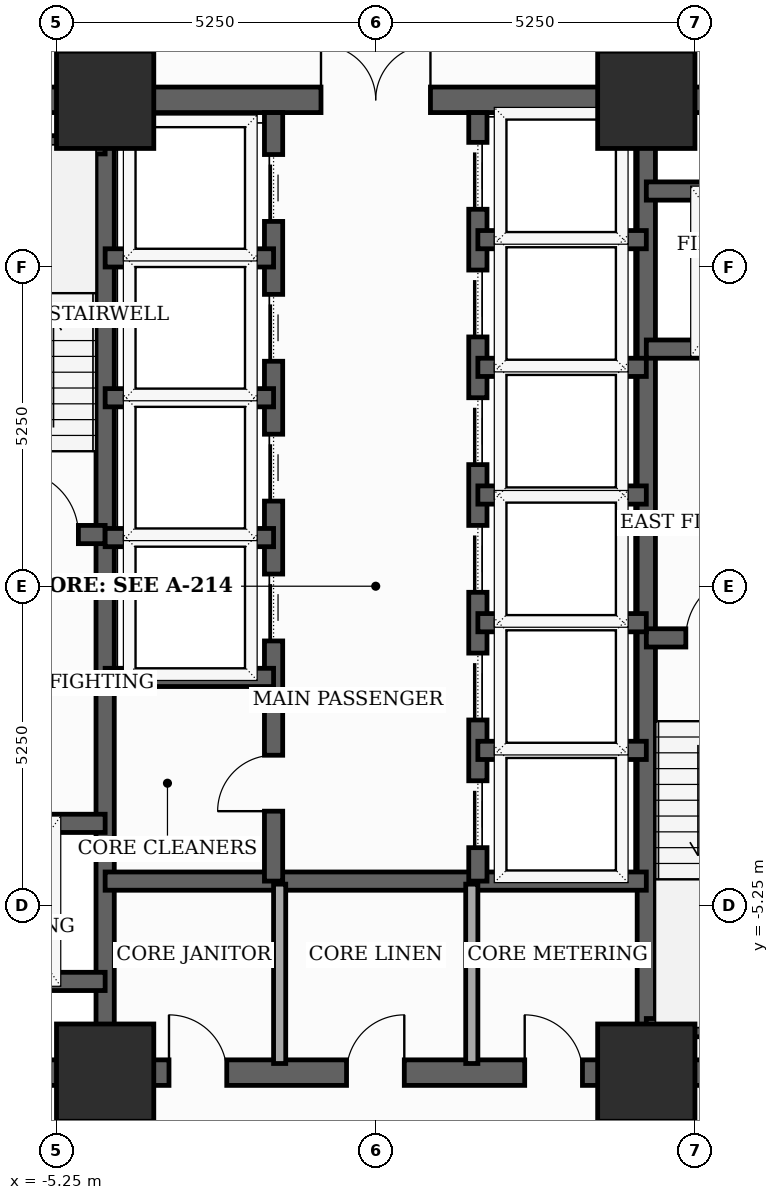
"""IFC4 building model, lengths in metres.
Left out: names, types, materials, properties, quantities, classifications, styles, units other than length and angle.
Written with IfcOpenShell. Run it as: python <this file> out.ifc"""

import sys

from ifc_helpers import new_model, si_unit, direction, frame, frame_2d, origin, origin_2d, place, context, subcontext, project, spatial, rectangle, extrude, element, fill, save


model = new_model("IFC4")
c1 = context("Model", 3, precision=1e-05, world=origin(), true_north=direction((0.0, 1.0)))
c2 = subcontext(c1, "Body", "Model", "MODEL_VIEW")
j1 = project(units=[si_unit("LENGTHUNIT", "METRE"), si_unit("PLANEANGLEUNIT", "RADIAN")], contexts=[c1])
p1 = place(None, origin())
s1 = spatial("IfcSite", under=j1, at=p1, CompositionType="ELEMENT")
p2 = place(p1, origin())
s2 = spatial("IfcBuilding", under=s1, at=p2, CompositionType="ELEMENT")
p3 = place(p2, frame((0.0, 0.0, 70.4)))
s3 = spatial("IfcBuildingStorey", under=s2, at=p3, CompositionType="ELEMENT", Elevation=70.4)
for number, where, z_axis, x_axis in (
    (1, (-4.45, -8.0, 0.0), (0.0, 0.0, 1.0), (1.0, 0.0, 0.0)),
    (2, (4.45, -8.0, 0.0), (0.0, 0.0, 1.0), (1.0, 0.0, 0.0)),
    (3, (4.45, 8.0, 0.0), (0.0, 0.0, 1.0), (1.0, 0.0, 0.0)),
    (4, (-4.45, 8.0, 0.0), (0.0, 0.0, 1.0), (1.0, 0.0, 0.0)),
):
    element("IfcColumn", number, at=place(p3, frame(where, z_axis=z_axis, x_axis=x_axis)), inside=s3, PredefinedType="COLUMN", context=c2, shape_type="SweptSolid", body=[
        extrude(rectangle(XDim=1.6, YDim=1.6, at=origin_2d()), origin(), (0.0, 0.0, 1.0), 3.7),
    ])
p4 = place(p3, frame((-8.0, -8.0, 0.0), z_axis=(0.0, 0.0, 1.0), x_axis=(1.0, 0.0, 0.0)))
e5 = element("IfcWall", 5, at=p4, inside=s3, PredefinedType="SHEAR", context=c2, shape_type="SweptSolid", body=[
    extrude(rectangle(XDim=16.0, YDim=0.42, at=frame_2d((8.0, 0.0))), origin(), (0.0, 0.0, 1.0), 3.5),
])
p5 = place(p4, frame((4.6, 0.0, 0.0)))
e6 = element("IfcOpeningElement", 6, at=p5, cuts=e5, PredefinedType="OPENING", context=c2, shape_type="SweptSolid", body=[
    extrude(rectangle(XDim=0.95, YDim=2.1, at=frame_2d((0.475, 1.05))), frame((0.0, 0.22, 0.0), z_axis=(0.0, -1.0, 0.0), x_axis=(1.0, 0.0, 0.0)), (0.0, 0.0, 1.0), 0.44),
])
p6 = place(p4, frame((7.52, 0.0, 0.0)))
e7 = element("IfcOpeningElement", 7, at=p6, cuts=e5, PredefinedType="OPENING", context=c2, shape_type="SweptSolid", body=[
    extrude(rectangle(XDim=0.95, YDim=2.1, at=frame_2d((0.475, 1.05))), frame((0.0, 0.22, 0.0), z_axis=(0.0, -1.0, 0.0), x_axis=(1.0, 0.0, 0.0)), (0.0, 0.0, 1.0), 0.44),
])
p7 = place(p4, frame((10.45, 0.0, 0.0)))
e8 = element("IfcOpeningElement", 8, at=p7, cuts=e5, PredefinedType="OPENING", context=c2, shape_type="SweptSolid", body=[
    extrude(rectangle(XDim=0.95, YDim=2.1, at=frame_2d((0.475, 1.05))), frame((0.0, 0.22, 0.0), z_axis=(0.0, -1.0, 0.0), x_axis=(1.0, 0.0, 0.0)), (0.0, 0.0, 1.0), 0.44),
])
p8 = place(p3, frame((-8.0, 8.0, 0.0), z_axis=(0.0, 0.0, 1.0), x_axis=(1.0, 0.0, 0.0)))
e9 = element("IfcWall", 9, at=p8, inside=s3, PredefinedType="SHEAR", context=c2, shape_type="SweptSolid", body=[
    extrude(rectangle(XDim=16.0, YDim=0.42, at=frame_2d((8.0, 0.0))), origin(), (0.0, 0.0, 1.0), 3.5),
])
p9 = place(p8, frame((7.1, 0.0, 0.0)))
e10 = element("IfcOpeningElement", 10, at=p9, cuts=e9, PredefinedType="OPENING", context=c2, shape_type="SweptSolid", body=[
    extrude(rectangle(XDim=1.8, YDim=2.15, at=frame_2d((0.9, 1.075))), frame((0.0, 0.22, 0.0), z_axis=(0.0, -1.0, 0.0), x_axis=(1.0, 0.0, 0.0)), (0.0, 0.0, 1.0), 0.44),
])
for number, where, z_axis, x_axis in (
    (11, (-4.45, -7.79, 0.0), (0.0, 0.0, 1.0), (0.0, 1.0, 0.0)),
    (12, (4.45, -7.79, 0.0), (0.0, 0.0, 1.0), (0.0, 1.0, 0.0)),
):
    element("IfcWall", number, at=place(p3, frame(where, z_axis=z_axis, x_axis=x_axis)), inside=s3, PredefinedType="SHEAR", context=c2, shape_type="SweptSolid", body=[
        extrude(rectangle(XDim=15.58, YDim=0.3, at=frame_2d((7.79, 0.0))), origin(), (0.0, 0.0, 1.0), 3.5),
    ])
p10 = place(p3, frame((-7.79, 0.85, 0.0), z_axis=(0.0, 0.0, 1.0), x_axis=(1.0, 0.0, 0.0)))
e13 = element("IfcWall", 13, at=p10, inside=s3, PredefinedType="SHEAR", context=c2, shape_type="SweptSolid", body=[
    extrude(rectangle(XDim=3.34, YDim=0.3, at=frame_2d((1.67, 0.0))), origin(), (0.0, 0.0, 1.0), 3.5),
])
p11 = place(p10, frame((1.85, 0.0, 0.0)))
e14 = element("IfcOpeningElement", 14, at=p11, cuts=e13, PredefinedType="OPENING", context=c2, shape_type="SweptSolid", body=[
    extrude(rectangle(XDim=1.05, YDim=2.15, at=frame_2d((0.525, 1.075))), frame((0.0, 0.16, 0.0), z_axis=(0.0, -1.0, 0.0), x_axis=(1.0, 0.0, 0.0)), (0.0, 0.0, 1.0), 0.32),
])
p12 = place(p3, frame((-7.79, 7.26, 0.0), z_axis=(0.0, 0.0, 1.0), x_axis=(1.0, 0.0, 0.0)))
e15 = element("IfcWall", 15, at=p12, inside=s3, PredefinedType="SHEAR", context=c2, shape_type="SweptSolid", body=[
    extrude(rectangle(XDim=3.34, YDim=0.3, at=frame_2d((1.67, 0.0))), origin(), (0.0, 0.0, 1.0), 3.5),
])
p13 = place(p3, frame((4.45, -0.85, 0.0), z_axis=(0.0, 0.0, 1.0), x_axis=(1.0, 0.0, 0.0)))
e16 = element("IfcWall", 16, at=p13, inside=s3, PredefinedType="SHEAR", context=c2, shape_type="SweptSolid", body=[
    extrude(rectangle(XDim=3.34, YDim=0.3, at=frame_2d((1.67, 0.0))), origin(), (0.0, 0.0, 1.0), 3.5),
])
p14 = place(p13, frame((0.65, 0.0, 0.0)))
e17 = element("IfcOpeningElement", 17, at=p14, cuts=e16, PredefinedType="OPENING", context=c2, shape_type="SweptSolid", body=[
    extrude(rectangle(XDim=1.05, YDim=2.15, at=frame_2d((0.525, 1.075))), frame((0.0, 0.16, 0.0), z_axis=(0.0, -1.0, 0.0), x_axis=(1.0, 0.0, 0.0)), (0.0, 0.0, 1.0), 0.32),
])
p15 = place(p3, frame((4.45, -7.26, 0.0), z_axis=(0.0, 0.0, 1.0), x_axis=(1.0, 0.0, 0.0)))
e18 = element("IfcWall", 18, at=p15, inside=s3, PredefinedType="SHEAR", context=c2, shape_type="SweptSolid", body=[
    extrude(rectangle(XDim=3.55, YDim=0.3, at=frame_2d((1.775, 0.0))), origin(), (0.0, 0.0, 1.0), 3.5),
])
p16 = place(p3, frame((-7.79, -3.9, 0.0), z_axis=(0.0, 0.0, 1.0), x_axis=(1.0, 0.0, 0.0)))
e19 = element("IfcWall", 19, at=p16, inside=s3, PredefinedType="SHEAR", context=c2, shape_type="SweptSolid", body=[
    extrude(rectangle(XDim=3.34, YDim=0.3, at=frame_2d((1.67, 0.0))), origin(), (0.0, 0.0, 1.0), 3.5),
])
p17 = place(p16, frame((1.27, 0.0, 0.0)))
e20 = element("IfcOpeningElement", 20, at=p17, cuts=e19, PredefinedType="OPENING", context=c2, shape_type="SweptSolid", body=[
    extrude(rectangle(XDim=1.1, YDim=2.1, at=frame_2d((0.55, 1.05))), frame((0.0, 0.16, 0.0), z_axis=(0.0, -1.0, 0.0), x_axis=(1.0, 0.0, 0.0)), (0.0, 0.0, 1.0), 0.32),
])
p18 = place(p3, frame((-7.79, -6.5, 0.0), z_axis=(0.0, 0.0, 1.0), x_axis=(1.0, 0.0, 0.0)))
e21 = element("IfcWall", 21, at=p18, inside=s3, PredefinedType="SHEAR", context=c2, shape_type="SweptSolid", body=[
    extrude(rectangle(XDim=3.34, YDim=0.3, at=frame_2d((1.67, 0.0))), origin(), (0.0, 0.0, 1.0), 3.5),
])
p19 = place(p3, frame((4.45, 3.9, 0.0), z_axis=(0.0, 0.0, 1.0), x_axis=(1.0, 0.0, 0.0)))
e22 = element("IfcWall", 22, at=p19, inside=s3, PredefinedType="SHEAR", context=c2, shape_type="SweptSolid", body=[
    extrude(rectangle(XDim=3.34, YDim=0.3, at=frame_2d((1.67, 0.0))), origin(), (0.0, 0.0, 1.0), 3.5),
])
p20 = place(p19, frame((1.18, 0.0, 0.0)))
e23 = element("IfcOpeningElement", 23, at=p20, cuts=e22, PredefinedType="OPENING", context=c2, shape_type="SweptSolid", body=[
    extrude(rectangle(XDim=1.1, YDim=2.1, at=frame_2d((0.55, 1.05))), frame((0.0, 0.16, 0.0), z_axis=(0.0, -1.0, 0.0), x_axis=(1.0, 0.0, 0.0)), (0.0, 0.0, 1.0), 0.32),
])
p21 = place(p3, frame((4.45, 6.5, 0.0), z_axis=(0.0, 0.0, 1.0), x_axis=(1.0, 0.0, 0.0)))
e24 = element("IfcWall", 24, at=p21, inside=s3, PredefinedType="SHEAR", context=c2, shape_type="SweptSolid", body=[
    extrude(rectangle(XDim=3.34, YDim=0.3, at=frame_2d((1.67, 0.0))), origin(), (0.0, 0.0, 1.0), 3.5),
])
p22 = place(p3, frame((-4.45, -4.85, 0.0), z_axis=(0.0, 0.0, 1.0), x_axis=(1.0, 0.0, 0.0)))
e25 = element("IfcWall", 25, at=p22, inside=s3, PredefinedType="SHEAR", context=c2, shape_type="SweptSolid", body=[
    extrude(rectangle(XDim=8.9, YDim=0.3, at=frame_2d((4.45, 0.0))), origin(), (0.0, 0.0, 1.0), 3.5),
])
p23 = place(p3, frame((-1.68, -4.85, 0.0), z_axis=(0.0, 0.0, 1.0), x_axis=(0.0, 1.0, 0.0)))
e26 = element("IfcWall", 26, at=p23, inside=s3, PredefinedType="SHEAR", context=c2, shape_type="SweptSolid", body=[
    extrude(rectangle(XDim=12.64, YDim=0.3, at=frame_2d((6.32, 0.0))), origin(), (0.0, 0.0, 1.0), 3.5),
])
p24 = place(p23, frame((3.95, 0.0, 0.0)))
e27 = element("IfcOpeningElement", 27, at=p24, cuts=e26, PredefinedType="OPENING", context=c2, shape_type="SweptSolid", body=[
    extrude(rectangle(XDim=1.1, YDim=2.1, at=frame_2d((0.55, 1.05))), frame((0.0, 0.16, 0.0), z_axis=(0.0, -1.0, 0.0), x_axis=(1.0, 0.0, 0.0)), (0.0, 0.0, 1.0), 0.32),
])
p25 = place(p23, frame((6.25, 0.0, 0.0)))
e28 = element("IfcOpeningElement", 28, at=p25, cuts=e26, PredefinedType="OPENING", context=c2, shape_type="SweptSolid", body=[
    extrude(rectangle(XDim=1.1, YDim=2.1, at=frame_2d((0.55, 1.05))), frame((0.0, 0.16, 0.0), z_axis=(0.0, -1.0, 0.0), x_axis=(1.0, 0.0, 0.0)), (0.0, 0.0, 1.0), 0.32),
])
p26 = place(p23, frame((8.55, 0.0, 0.0)))
e29 = element("IfcOpeningElement", 29, at=p26, cuts=e26, PredefinedType="OPENING", context=c2, shape_type="SweptSolid", body=[
    extrude(rectangle(XDim=1.1, YDim=2.1, at=frame_2d((0.55, 1.05))), frame((0.0, 0.16, 0.0), z_axis=(0.0, -1.0, 0.0), x_axis=(1.0, 0.0, 0.0)), (0.0, 0.0, 1.0), 0.32),
])
p27 = place(p23, frame((10.85, 0.0, 0.0)))
e30 = element("IfcOpeningElement", 30, at=p27, cuts=e26, PredefinedType="OPENING", context=c2, shape_type="SweptSolid", body=[
    extrude(rectangle(XDim=1.1, YDim=2.1, at=frame_2d((0.55, 1.05))), frame((0.0, 0.16, 0.0), z_axis=(0.0, -1.0, 0.0), x_axis=(1.0, 0.0, 0.0)), (0.0, 0.0, 1.0), 0.32),
])
p28 = place(p23, frame((1.15, 0.0, 0.0)))
e31 = element("IfcOpeningElement", 31, at=p28, cuts=e26, PredefinedType="OPENING", context=c2, shape_type="SweptSolid", body=[
    extrude(rectangle(XDim=0.92, YDim=2.1, at=frame_2d((0.46, 1.05))), frame((0.0, 0.16, 0.0), z_axis=(0.0, -1.0, 0.0), x_axis=(1.0, 0.0, 0.0)), (0.0, 0.0, 1.0), 0.32),
])
p29 = place(p3, frame((1.68, -4.85, 0.0), z_axis=(0.0, 0.0, 1.0), x_axis=(0.0, 1.0, 0.0)))
e32 = element("IfcWall", 32, at=p29, inside=s3, PredefinedType="SHEAR", context=c2, shape_type="SweptSolid", body=[
    extrude(rectangle(XDim=12.64, YDim=0.3, at=frame_2d((6.32, 0.0))), origin(), (0.0, 0.0, 1.0), 3.5),
])
p30 = place(p29, frame((0.55, 0.0, 0.0)))
e33 = element("IfcOpeningElement", 33, at=p30, cuts=e32, PredefinedType="OPENING", context=c2, shape_type="SweptSolid", body=[
    extrude(rectangle(XDim=1.1, YDim=2.1, at=frame_2d((0.55, 1.05))), frame((0.0, 0.16, 0.0), z_axis=(0.0, -1.0, 0.0), x_axis=(1.0, 0.0, 0.0)), (0.0, 0.0, 1.0), 0.32),
])
p31 = place(p29, frame((2.65, 0.0, 0.0)))
e34 = element("IfcOpeningElement", 34, at=p31, cuts=e32, PredefinedType="OPENING", context=c2, shape_type="SweptSolid", body=[
    extrude(rectangle(XDim=1.1, YDim=2.1, at=frame_2d((0.55, 1.05))), frame((0.0, 0.16, 0.0), z_axis=(0.0, -1.0, 0.0), x_axis=(1.0, 0.0, 0.0)), (0.0, 0.0, 1.0), 0.32),
])
p32 = place(p29, frame((4.75, 0.0, 0.0)))
e35 = element("IfcOpeningElement", 35, at=p32, cuts=e32, PredefinedType="OPENING", context=c2, shape_type="SweptSolid", body=[
    extrude(rectangle(XDim=1.1, YDim=2.1, at=frame_2d((0.55, 1.05))), frame((0.0, 0.16, 0.0), z_axis=(0.0, -1.0, 0.0), x_axis=(1.0, 0.0, 0.0)), (0.0, 0.0, 1.0), 0.32),
])
p33 = place(p29, frame((6.85, 0.0, 0.0)))
e36 = element("IfcOpeningElement", 36, at=p33, cuts=e32, PredefinedType="OPENING", context=c2, shape_type="SweptSolid", body=[
    extrude(rectangle(XDim=1.1, YDim=2.1, at=frame_2d((0.55, 1.05))), frame((0.0, 0.16, 0.0), z_axis=(0.0, -1.0, 0.0), x_axis=(1.0, 0.0, 0.0)), (0.0, 0.0, 1.0), 0.32),
])
p34 = place(p29, frame((8.95, 0.0, 0.0)))
e37 = element("IfcOpeningElement", 37, at=p34, cuts=e32, PredefinedType="OPENING", context=c2, shape_type="SweptSolid", body=[
    extrude(rectangle(XDim=1.1, YDim=2.1, at=frame_2d((0.55, 1.05))), frame((0.0, 0.16, 0.0), z_axis=(0.0, -1.0, 0.0), x_axis=(1.0, 0.0, 0.0)), (0.0, 0.0, 1.0), 0.32),
])
p35 = place(p29, frame((11.05, 0.0, 0.0)))
e38 = element("IfcOpeningElement", 38, at=p35, cuts=e32, PredefinedType="OPENING", context=c2, shape_type="SweptSolid", body=[
    extrude(rectangle(XDim=1.1, YDim=2.1, at=frame_2d((0.55, 1.05))), frame((0.0, 0.16, 0.0), z_axis=(0.0, -1.0, 0.0), x_axis=(1.0, 0.0, 0.0)), (0.0, 0.0, 1.0), 0.32),
])
for number, where, z_axis, x_axis in (
    (39, (-4.45, -1.5, 0.0), (0.0, 0.0, 1.0), (1.0, 0.0, 0.0)),
    (40, (-4.45, 0.8, 0.0), (0.0, 0.0, 1.0), (1.0, 0.0, 0.0)),
    (41, (-4.45, 3.1, 0.0), (0.0, 0.0, 1.0), (1.0, 0.0, 0.0)),
    (42, (-4.45, 5.4, 0.0), (0.0, 0.0, 1.0), (1.0, 0.0, 0.0)),
    (43, (1.68, 1.5, 0.0), (0.0, 0.0, 1.0), (1.0, 0.0, 0.0)),
    (44, (1.68, 3.6, 0.0), (0.0, 0.0, 1.0), (1.0, 0.0, 0.0)),
    (45, (1.68, 5.7, 0.0), (0.0, 0.0, 1.0), (1.0, 0.0, 0.0)),
    (46, (1.68, -2.7, 0.0), (0.0, 0.0, 1.0), (1.0, 0.0, 0.0)),
    (47, (1.68, -0.6, 0.0), (0.0, 0.0, 1.0), (1.0, 0.0, 0.0)),
):
    element("IfcWall", number, at=place(p3, frame(where, z_axis=z_axis, x_axis=x_axis)), inside=s3, PredefinedType="SHEAR", context=c2, shape_type="SweptSolid", body=[
        extrude(rectangle(XDim=2.77, YDim=0.3, at=frame_2d((1.385, 0.0))), origin(), (0.0, 0.0, 1.0), 3.5),
    ])
for number, where, z_axis, x_axis in (
    (48, (-1.58, -7.85, 0.0), (0.0, 0.0, 1.0), (0.0, 1.0, 0.0)),
    (49, (1.58, -7.85, 0.0), (0.0, 0.0, 1.0), (0.0, 1.0, 0.0)),
):
    element("IfcWall", number, at=place(p3, frame(where, z_axis=z_axis, x_axis=x_axis)), inside=s3, PredefinedType="SOLIDWALL", context=c2, shape_type="SweptSolid", body=[
        extrude(rectangle(XDim=2.95, YDim=0.2, at=frame_2d((1.475, 0.0))), origin(), (0.0, 0.0, 1.0), 2.885),
    ])
p36 = place(p5, origin())
e50 = element("IfcDoor", 50, at=p36, inside=s3, OperationType="SINGLE_SWING_LEFT", PredefinedType="DOOR", context=c2, shape_type="SweptSolid", body=[
    extrude(rectangle(XDim=0.95, YDim=2.1, at=frame_2d((0.475, 1.05))), frame((0.0, 0.025, 0.0), z_axis=(0.0, -1.0, 0.0), x_axis=(1.0, 0.0, 0.0)), (0.0, 0.0, 1.0), 0.05),
])
fill(e6, e50)
p37 = place(p6, origin())
e51 = element("IfcDoor", 51, at=p37, inside=s3, OperationType="SINGLE_SWING_RIGHT", PredefinedType="DOOR", context=c2, shape_type="SweptSolid", body=[
    extrude(rectangle(XDim=0.95, YDim=2.1, at=frame_2d((0.475, 1.05))), frame((0.0, 0.025, 0.0), z_axis=(0.0, -1.0, 0.0), x_axis=(1.0, 0.0, 0.0)), (0.0, 0.0, 1.0), 0.05),
])
fill(e7, e51)
p38 = place(p7, origin())
e52 = element("IfcDoor", 52, at=p38, inside=s3, OperationType="SINGLE_SWING_LEFT", PredefinedType="DOOR", context=c2, shape_type="SweptSolid", body=[
    extrude(rectangle(XDim=0.95, YDim=2.1, at=frame_2d((0.475, 1.05))), frame((0.0, 0.025, 0.0), z_axis=(0.0, -1.0, 0.0), x_axis=(1.0, 0.0, 0.0)), (0.0, 0.0, 1.0), 0.05),
])
fill(e8, e52)
p39 = place(p9, origin())
e53 = element("IfcDoor", 53, at=p39, inside=s3, OperationType="DOUBLE_DOOR_SINGLE_SWING", PredefinedType="DOOR", context=c2, shape_type="SweptSolid", body=[
    extrude(rectangle(XDim=1.8, YDim=2.15, at=frame_2d((0.9, 1.075))), frame((0.0, 0.025, 0.0), z_axis=(0.0, -1.0, 0.0), x_axis=(1.0, 0.0, 0.0)), (0.0, 0.0, 1.0), 0.05),
])
fill(e10, e53)
p40 = place(p11, origin())
e54 = element("IfcDoor", 54, at=p40, inside=s3, OperationType="SINGLE_SWING_LEFT", PredefinedType="DOOR", context=c2, shape_type="SweptSolid", body=[
    extrude(rectangle(XDim=1.05, YDim=2.15, at=frame_2d((0.525, 1.075))), frame((0.0, 0.025, 0.0), z_axis=(0.0, -1.0, 0.0), x_axis=(1.0, 0.0, 0.0)), (0.0, 0.0, 1.0), 0.05),
])
fill(e14, e54)
p41 = place(p14, origin())
e55 = element("IfcDoor", 55, at=p41, inside=s3, OperationType="SINGLE_SWING_RIGHT", PredefinedType="DOOR", context=c2, shape_type="SweptSolid", body=[
    extrude(rectangle(XDim=1.05, YDim=2.15, at=frame_2d((0.525, 1.075))), frame((0.0, 0.025, 0.0), z_axis=(0.0, -1.0, 0.0), x_axis=(1.0, 0.0, 0.0)), (0.0, 0.0, 1.0), 0.05),
])
fill(e17, e55)
p42 = place(p24, origin())
e56 = element("IfcDoor", 56, at=p42, inside=s3, OperationType="SLIDING_TO_LEFT", PredefinedType="DOOR", context=c2, shape_type="SweptSolid", body=[
    extrude(rectangle(XDim=1.1, YDim=2.1, at=frame_2d((0.55, 1.05))), frame((0.0, 0.025, 0.0), z_axis=(0.0, -1.0, 0.0), x_axis=(1.0, 0.0, 0.0)), (0.0, 0.0, 1.0), 0.05),
])
fill(e27, e56)
p43 = place(p25, origin())
e57 = element("IfcDoor", 57, at=p43, inside=s3, OperationType="SLIDING_TO_LEFT", PredefinedType="DOOR", context=c2, shape_type="SweptSolid", body=[
    extrude(rectangle(XDim=1.1, YDim=2.1, at=frame_2d((0.55, 1.05))), frame((0.0, 0.025, 0.0), z_axis=(0.0, -1.0, 0.0), x_axis=(1.0, 0.0, 0.0)), (0.0, 0.0, 1.0), 0.05),
])
fill(e28, e57)
p44 = place(p26, origin())
e58 = element("IfcDoor", 58, at=p44, inside=s3, OperationType="SLIDING_TO_LEFT", PredefinedType="DOOR", context=c2, shape_type="SweptSolid", body=[
    extrude(rectangle(XDim=1.1, YDim=2.1, at=frame_2d((0.55, 1.05))), frame((0.0, 0.025, 0.0), z_axis=(0.0, -1.0, 0.0), x_axis=(1.0, 0.0, 0.0)), (0.0, 0.0, 1.0), 0.05),
])
fill(e29, e58)
p45 = place(p27, origin())
e59 = element("IfcDoor", 59, at=p45, inside=s3, OperationType="SLIDING_TO_LEFT", PredefinedType="DOOR", context=c2, shape_type="SweptSolid", body=[
    extrude(rectangle(XDim=1.1, YDim=2.1, at=frame_2d((0.55, 1.05))), frame((0.0, 0.025, 0.0), z_axis=(0.0, -1.0, 0.0), x_axis=(1.0, 0.0, 0.0)), (0.0, 0.0, 1.0), 0.05),
])
fill(e30, e59)
p46 = place(p28, origin())
e60 = element("IfcDoor", 60, at=p46, inside=s3, OperationType="SINGLE_SWING_LEFT", PredefinedType="DOOR", context=c2, shape_type="SweptSolid", body=[
    extrude(rectangle(XDim=0.92, YDim=2.1, at=frame_2d((0.46, 1.05))), frame((0.0, 0.025, 0.0), z_axis=(0.0, -1.0, 0.0), x_axis=(1.0, 0.0, 0.0)), (0.0, 0.0, 1.0), 0.05),
])
fill(e31, e60)
p47 = place(p30, origin())
e61 = element("IfcDoor", 61, at=p47, inside=s3, OperationType="SLIDING_TO_LEFT", PredefinedType="DOOR", context=c2, shape_type="SweptSolid", body=[
    extrude(rectangle(XDim=1.1, YDim=2.1, at=frame_2d((0.55, 1.05))), frame((0.0, 0.025, 0.0), z_axis=(0.0, -1.0, 0.0), x_axis=(1.0, 0.0, 0.0)), (0.0, 0.0, 1.0), 0.05),
])
fill(e33, e61)
p48 = place(p31, origin())
e62 = element("IfcDoor", 62, at=p48, inside=s3, OperationType="SLIDING_TO_LEFT", PredefinedType="DOOR", context=c2, shape_type="SweptSolid", body=[
    extrude(rectangle(XDim=1.1, YDim=2.1, at=frame_2d((0.55, 1.05))), frame((0.0, 0.025, 0.0), z_axis=(0.0, -1.0, 0.0), x_axis=(1.0, 0.0, 0.0)), (0.0, 0.0, 1.0), 0.05),
])
fill(e34, e62)
p49 = place(p32, origin())
e63 = element("IfcDoor", 63, at=p49, inside=s3, OperationType="SLIDING_TO_LEFT", PredefinedType="DOOR", context=c2, shape_type="SweptSolid", body=[
    extrude(rectangle(XDim=1.1, YDim=2.1, at=frame_2d((0.55, 1.05))), frame((0.0, 0.025, 0.0), z_axis=(0.0, -1.0, 0.0), x_axis=(1.0, 0.0, 0.0)), (0.0, 0.0, 1.0), 0.05),
])
fill(e35, e63)
p50 = place(p33, origin())
e64 = element("IfcDoor", 64, at=p50, inside=s3, OperationType="SLIDING_TO_LEFT", PredefinedType="DOOR", context=c2, shape_type="SweptSolid", body=[
    extrude(rectangle(XDim=1.1, YDim=2.1, at=frame_2d((0.55, 1.05))), frame((0.0, 0.025, 0.0), z_axis=(0.0, -1.0, 0.0), x_axis=(1.0, 0.0, 0.0)), (0.0, 0.0, 1.0), 0.05),
])
fill(e36, e64)
p51 = place(p34, origin())
e65 = element("IfcDoor", 65, at=p51, inside=s3, OperationType="SLIDING_TO_LEFT", PredefinedType="DOOR", context=c2, shape_type="SweptSolid", body=[
    extrude(rectangle(XDim=1.1, YDim=2.1, at=frame_2d((0.55, 1.05))), frame((0.0, 0.025, 0.0), z_axis=(0.0, -1.0, 0.0), x_axis=(1.0, 0.0, 0.0)), (0.0, 0.0, 1.0), 0.05),
])
fill(e37, e65)
p52 = place(p35, origin())
e66 = element("IfcDoor", 66, at=p52, inside=s3, OperationType="SLIDING_TO_LEFT", PredefinedType="DOOR", context=c2, shape_type="SweptSolid", body=[
    extrude(rectangle(XDim=1.1, YDim=2.1, at=frame_2d((0.55, 1.05))), frame((0.0, 0.025, 0.0), z_axis=(0.0, -1.0, 0.0), x_axis=(1.0, 0.0, 0.0)), (0.0, 0.0, 1.0), 0.05),
])
fill(e38, e66)
save(model, sys.argv[1])
